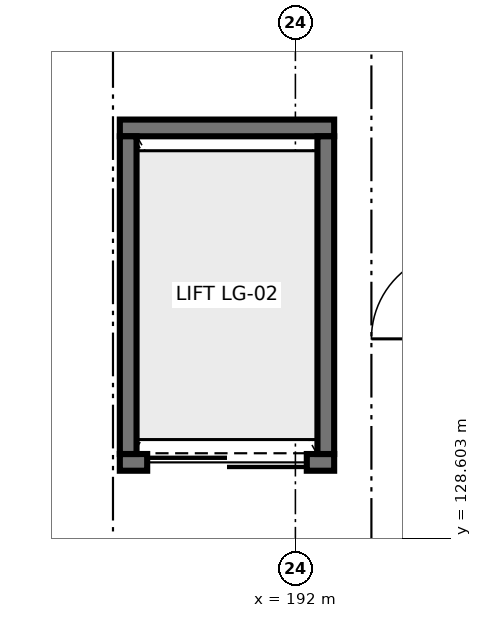
"""IFC4 building model, lengths in metres.
Left out: names, types, materials, properties, quantities, classifications, styles, units other than length and angle.
Written with IfcOpenShell. Run it as: python <this file> out.ifc"""

import sys

from ifc_helpers import new_model, si_unit, direction, frame, frame_2d, origin, place, context, subcontext, project, spatial, rectangle, extrude, element, fill, save


model = new_model("IFC4")
c1 = context("Model", 3, precision=1e-05, world=origin(), true_north=direction((0.0, 1.0)))
c2 = subcontext(c1, "Body", "Model", "MODEL_VIEW")
j1 = project(units=[si_unit("LENGTHUNIT", "METRE"), si_unit("PLANEANGLEUNIT", "RADIAN")], contexts=[c1])
p1 = place(None, origin())
s1 = spatial("IfcSite", under=j1, at=p1, CompositionType="ELEMENT")
p2 = place(p1, origin())
s2 = spatial("IfcBuilding", under=s1, at=p2, CompositionType="ELEMENT")
p3 = place(p2, origin())
s3 = spatial("IfcBuildingStorey", under=s2, at=p3, CompositionType="ELEMENT", Elevation=0.0)
p4 = place(p3, frame((189.69, 129.6, 0.0), z_axis=(0.0, 0.0, 1.0), x_axis=(1.0, 0.0, 0.0)))
e1 = element("IfcWall", 1, at=p4, inside=s3, PredefinedType="SHEAR", context=c2, shape_type="SweptSolid", body=[
    extrude(rectangle(XDim=2.82, YDim=0.22, at=frame_2d((1.41, 0.0))), origin(), (0.0, 0.0, 1.0), 4.245),
])
p5 = place(p4, frame((0.36, 0.0, 0.0)))
e2 = element("IfcOpeningElement", 2, at=p5, cuts=e1, PredefinedType="OPENING", context=c2, shape_type="SweptSolid", body=[
    extrude(rectangle(XDim=2.1, YDim=2.45, at=frame_2d((1.05, 1.225))), frame((0.0, 0.12, 0.0), z_axis=(0.0, -1.0, 0.0), x_axis=(1.0, 0.0, 0.0)), (0.0, 0.0, 1.0), 0.24),
])
p6 = place(p3, frame((189.69, 134.0, 0.0), z_axis=(0.0, 0.0, 1.0), x_axis=(1.0, 0.0, 0.0)))
e3 = element("IfcWall", 3, at=p6, inside=s3, PredefinedType="SHEAR", context=c2, shape_type="SweptSolid", body=[
    extrude(rectangle(XDim=2.82, YDim=0.22, at=frame_2d((1.41, 0.0))), origin(), (0.0, 0.0, 1.0), 4.245),
])
p7 = place(p3, frame((189.8, 129.71, 0.0), z_axis=(0.0, 0.0, 1.0), x_axis=(0.0, 1.0, 0.0)))
e4 = element("IfcWall", 4, at=p7, inside=s3, PredefinedType="SHEAR", context=c2, shape_type="SweptSolid", body=[
    extrude(rectangle(XDim=4.18, YDim=0.22, at=frame_2d((2.09, 0.0))), origin(), (0.0, 0.0, 1.0), 5.12),
])
p8 = place(p3, frame((192.4, 129.71, 0.0), z_axis=(0.0, 0.0, 1.0), x_axis=(0.0, 1.0, 0.0)))
e5 = element("IfcWall", 5, at=p8, inside=s3, PredefinedType="SHEAR", context=c2, shape_type="SweptSolid", body=[
    extrude(rectangle(XDim=4.18, YDim=0.22, at=frame_2d((2.09, 0.0))), origin(), (0.0, 0.0, 1.0), 4.245),
])
p9 = place(p5, origin())
e6 = element("IfcDoor", 6, at=p9, inside=s3, OperationType="DOUBLE_DOOR_SLIDING", PredefinedType="DOOR", context=c2, shape_type="SweptSolid", body=[
    extrude(rectangle(XDim=2.1, YDim=2.45, at=frame_2d((1.05, 1.225))), frame((0.0, 0.025, 0.0), z_axis=(0.0, -1.0, 0.0), x_axis=(1.0, 0.0, 0.0)), (0.0, 0.0, 1.0), 0.05),
])
fill(e2, e6)
save(model, sys.argv[1])
